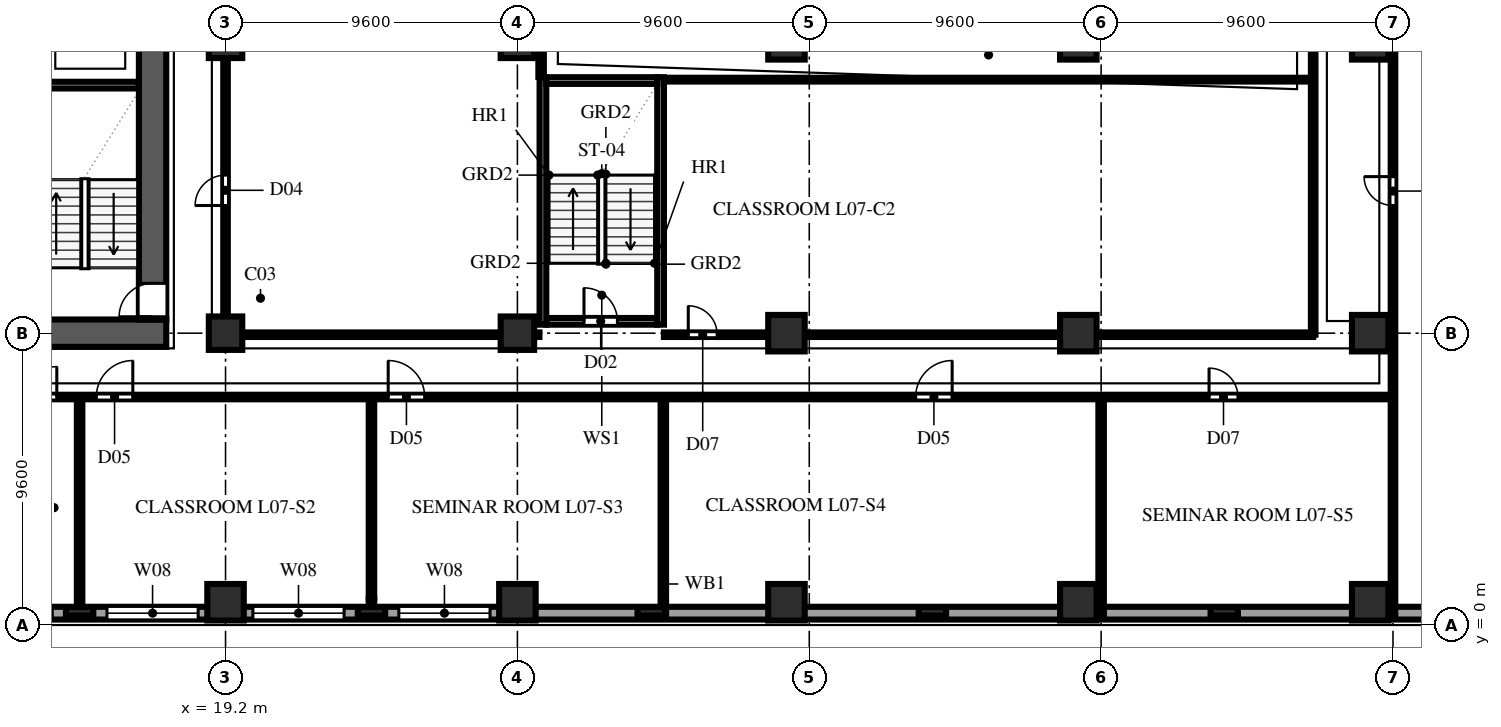
"""IFC4 building model, lengths in metres.
Left out: names, types, materials, properties, quantities, classifications, styles, units other than length and angle.
Written with IfcOpenShell. Run it as: python <this file> out.ifc"""

import sys

from ifc_helpers import new_model, si_unit, direction, frame, frame_2d, origin, origin_2d, place, context, subcontext, project, spatial, rectangle, extrude, element, fill, save


model = new_model("IFC4")
c1 = context("Model", 3, precision=1e-05, world=origin(), true_north=direction((0.0, 1.0)))
c2 = subcontext(c1, "Body", "Model", "MODEL_VIEW")
j1 = project(units=[si_unit("LENGTHUNIT", "METRE"), si_unit("PLANEANGLEUNIT", "RADIAN")], contexts=[c1])
p1 = place(None, origin())
s1 = spatial("IfcSite", under=j1, at=p1, CompositionType="ELEMENT")
p2 = place(p1, origin())
s2 = spatial("IfcBuilding", under=s1, at=p2, CompositionType="ELEMENT")
p3 = place(p2, frame((0.0, 0.0, 31.8)))
s3 = spatial("IfcBuildingStorey", under=s2, at=p3, CompositionType="ELEMENT", Elevation=31.8)
p4 = place(p3, frame((2.65, 9.6, 0.0), z_axis=(0.0, 0.0, 1.0), x_axis=(1.0, 0.0, 0.0)))
e1 = element("IfcWall", 1, at=p4, inside=s3, PredefinedType="SHEAR", context=c2, shape_type="SweptSolid", body=[
    extrude(rectangle(XDim=14.6, YDim=0.9, at=frame_2d((7.3, 0.0))), origin(), (0.0, 0.0, 1.0), 3.54),
])
p5 = place(p3, frame((16.8, 10.05, 0.0), z_axis=(0.0, 0.0, 1.0), x_axis=(0.0, 1.0, 0.0)))
e2 = element("IfcWall", 2, at=p5, inside=s3, PredefinedType="SHEAR", context=c2, shape_type="SweptSolid", body=[
    extrude(rectangle(XDim=12.35, YDim=0.9, at=frame_2d((6.175, 0.0))), origin(), (0.0, 0.0, 1.0), 3.54),
])
p6 = place(p5, frame((0.09, 0.0, 0.0)))
e3 = element("IfcOpeningElement", 3, at=p6, cuts=e2, PredefinedType="OPENING", context=c2, shape_type="SweptSolid", body=[
    extrude(rectangle(XDim=1.1, YDim=2.2, at=frame_2d((0.55, 1.1))), frame((0.0, 0.462, 0.0), z_axis=(0.0, -1.0, 0.0), x_axis=(1.0, 0.0, 0.0)), (0.0, 0.0, 1.0), 0.924),
])
p7 = place(p3, frame((19.2, 0.75, 0.0), z_axis=(0.0, 0.0, 1.0), x_axis=(1.0, 0.0, 0.0)))
e4 = element("IfcColumn", 4, at=p7, inside=s3, PredefinedType="COLUMN", context=c2, shape_type="SweptSolid", body=[
    extrude(rectangle(XDim=1.2, YDim=1.2, at=origin_2d()), origin(), (0.0, 0.0, 1.0), 3.8),
])
for number, where, z_axis, x_axis in (
    (5, (19.2, 9.6, 0.0), (0.0, 0.0, 1.0), (1.0, 0.0, 0.0)),
    (6, (19.2, 19.2, 0.0), (0.0, 0.0, 1.0), (1.0, 0.0, 0.0)),
):
    element("IfcColumn", number, at=place(p3, frame(where, z_axis=z_axis, x_axis=x_axis)), inside=s3, PredefinedType="COLUMN", context=c2, shape_type="SweptSolid", body=[
        extrude(rectangle(XDim=1.1, YDim=1.1, at=origin_2d()), origin(), (0.0, 0.0, 1.0), 3.8),
    ])
p8 = place(p3, frame((28.8, 0.75, 0.0), z_axis=(0.0, 0.0, 1.0), x_axis=(1.0, 0.0, 0.0)))
e7 = element("IfcColumn", 7, at=p8, inside=s3, PredefinedType="COLUMN", context=c2, shape_type="SweptSolid", body=[
    extrude(rectangle(XDim=1.2, YDim=1.2, at=origin_2d()), origin(), (0.0, 0.0, 1.0), 3.8),
])
for number, where, z_axis, x_axis in (
    (8, (28.8, 9.6, 0.0), (0.0, 0.0, 1.0), (1.0, 0.0, 0.0)),
    (9, (28.8, 19.2, 0.0), (0.0, 0.0, 1.0), (1.0, 0.0, 0.0)),
):
    element("IfcColumn", number, at=place(p3, frame(where, z_axis=z_axis, x_axis=x_axis)), inside=s3, PredefinedType="COLUMN", context=c2, shape_type="SweptSolid", body=[
        extrude(rectangle(XDim=1.1, YDim=1.1, at=origin_2d()), origin(), (0.0, 0.0, 1.0), 3.8),
    ])
for number, where, z_axis, x_axis in (
    (10, (37.65, 0.75, 0.0), (0.0, 0.0, 1.0), (1.0, 0.0, 0.0)),
    (11, (37.65, 9.6, 0.0), (0.0, 0.0, 1.0), (1.0, 0.0, 0.0)),
    (12, (37.65, 19.2, 0.0), (0.0, 0.0, 1.0), (1.0, 0.0, 0.0)),
    (13, (47.25, 0.75, 0.0), (0.0, 0.0, 1.0), (1.0, 0.0, 0.0)),
    (14, (47.25, 9.6, 0.0), (0.0, 0.0, 1.0), (1.0, 0.0, 0.0)),
    (15, (47.25, 19.2, 0.0), (0.0, 0.0, 1.0), (1.0, 0.0, 0.0)),
    (16, (56.85, 0.75, 0.0), (0.0, 0.0, 1.0), (1.0, 0.0, 0.0)),
    (17, (56.85, 9.6, 0.0), (0.0, 0.0, 1.0), (1.0, 0.0, 0.0)),
    (18, (56.85, 19.2, 0.0), (0.0, 0.0, 1.0), (1.0, 0.0, 0.0)),
):
    element("IfcColumn", number, at=place(p3, frame(where, z_axis=z_axis, x_axis=x_axis)), inside=s3, PredefinedType="COLUMN", context=c2, shape_type="SweptSolid", body=[
        extrude(rectangle(XDim=1.2, YDim=1.2, at=origin_2d()), origin(), (0.0, 0.0, 1.0), 3.8),
    ])
for number, where, z_axis, x_axis in (
    (19, (14.4, 0.45, 0.0), (0.0, 0.0, 1.0), (1.0, 0.0, 0.0)),
    (20, (24.0, 0.45, 0.0), (0.0, 0.0, 1.0), (1.0, 0.0, 0.0)),
    (21, (33.2, 0.45, 0.0), (0.0, 0.0, 1.0), (1.0, 0.0, 0.0)),
    (22, (42.45, 0.45, 0.0), (0.0, 0.0, 1.0), (1.0, 0.0, 0.0)),
    (23, (52.05, 0.45, 0.0), (0.0, 0.0, 1.0), (1.0, 0.0, 0.0)),
):
    element("IfcColumn", number, at=place(p3, frame(where, z_axis=z_axis, x_axis=x_axis)), inside=s3, PredefinedType="PILASTER", context=c2, shape_type="SweptSolid", body=[
        extrude(rectangle(XDim=0.9, YDim=0.28, at=origin_2d()), origin(), (0.0, 0.0, 1.0), 3.8),
    ])
p9 = place(p3, frame((1.84, 0.39, 0.0), z_axis=(0.0, 0.0, 1.0), x_axis=(1.0, 0.0, 0.0)))
e24 = element("IfcWall", 24, at=p9, inside=s3, PredefinedType="SOLIDWALL", context=c2, shape_type="SweptSolid", body=[
    extrude(rectangle(XDim=63.52, YDim=0.42, at=frame_2d((31.76, 0.0))), origin(), (0.0, 0.0, 1.0), 3.54),
])
p10 = place(p9, frame((3.86, 0.0, 0.75)))
e25 = element("IfcOpeningElement", 25, at=p10, cuts=e24, PredefinedType="OPENING", context=c2, shape_type="SweptSolid", body=[
    extrude(rectangle(XDim=3.0, YDim=1.9, at=frame_2d((1.5, 0.95))), frame((0.0, 0.222, 0.0), z_axis=(0.0, -1.0, 0.0), x_axis=(1.0, 0.0, 0.0)), (0.0, 0.0, 1.0), 0.444),
])
p11 = place(p9, frame((8.66, 0.0, 0.75)))
e26 = element("IfcOpeningElement", 26, at=p11, cuts=e24, PredefinedType="OPENING", context=c2, shape_type="SweptSolid", body=[
    extrude(rectangle(XDim=3.0, YDim=1.9, at=frame_2d((1.5, 0.95))), frame((0.0, 0.222, 0.0), z_axis=(0.0, -1.0, 0.0), x_axis=(1.0, 0.0, 0.0)), (0.0, 0.0, 1.0), 0.444),
])
p12 = place(p9, frame((13.46, 0.0, 0.75)))
e27 = element("IfcOpeningElement", 27, at=p12, cuts=e24, PredefinedType="OPENING", context=c2, shape_type="SweptSolid", body=[
    extrude(rectangle(XDim=3.0, YDim=1.9, at=frame_2d((1.5, 0.95))), frame((0.0, 0.222, 0.0), z_axis=(0.0, -1.0, 0.0), x_axis=(1.0, 0.0, 0.0)), (0.0, 0.0, 1.0), 0.444),
])
p13 = place(p9, frame((18.26, 0.0, 0.75)))
e28 = element("IfcOpeningElement", 28, at=p13, cuts=e24, PredefinedType="OPENING", context=c2, shape_type="SweptSolid", body=[
    extrude(rectangle(XDim=3.0, YDim=1.9, at=frame_2d((1.5, 0.95))), frame((0.0, 0.222, 0.0), z_axis=(0.0, -1.0, 0.0), x_axis=(1.0, 0.0, 0.0)), (0.0, 0.0, 1.0), 0.444),
])
p14 = place(p9, frame((23.06, 0.0, 0.75)))
e29 = element("IfcOpeningElement", 29, at=p14, cuts=e24, PredefinedType="OPENING", context=c2, shape_type="SweptSolid", body=[
    extrude(rectangle(XDim=3.0, YDim=1.9, at=frame_2d((1.5, 0.95))), frame((0.0, 0.222, 0.0), z_axis=(0.0, -1.0, 0.0), x_axis=(1.0, 0.0, 0.0)), (0.0, 0.0, 1.0), 0.444),
])
p15 = place(p3, frame((12.75, 17.76, 0.0), z_axis=(0.0, 0.0, 1.0), x_axis=(1.0, 0.0, 0.0)))
e30 = element("IfcWall", 30, at=p15, inside=s3, PredefinedType="SOLIDWALL", context=c2, shape_type="SweptSolid", body=[
    extrude(rectangle(XDim=3.6, YDim=0.22, at=frame_2d((1.8, 0.0))), origin(), (0.0, 0.0, 1.0), 3.54),
])
p16 = place(p3, frame((29.75, 9.99, 0.0), z_axis=(0.0, 0.0, 1.0), x_axis=(1.0, 0.0, 0.0)))
e31 = element("IfcWall", 31, at=p16, inside=s3, PredefinedType="SOLIDWALL", context=c2, shape_type="SweptSolid", body=[
    extrude(rectangle(XDim=3.65, YDim=0.22, at=frame_2d((1.825, 0.0))), origin(), (0.0, 0.0, 1.0), 3.54),
])
p17 = place(p16, frame((1.24, 0.0, 0.0)))
e32 = element("IfcOpeningElement", 32, at=p17, cuts=e31, PredefinedType="OPENING", context=c2, shape_type="SweptSolid", body=[
    extrude(rectangle(XDim=1.1, YDim=2.2, at=frame_2d((0.55, 1.1))), frame((0.0, 0.122, 0.0), z_axis=(0.0, -1.0, 0.0), x_axis=(1.0, 0.0, 0.0)), (0.0, 0.0, 1.0), 0.244),
])
for number, where, z_axis, x_axis in (
    (33, (29.64, 9.88, 0.0), (0.0, 0.0, 1.0), (0.0, 1.0, 0.0)),
    (34, (33.51, 9.88, 0.0), (0.0, 0.0, 1.0), (0.0, 1.0, 0.0)),
):
    element("IfcWall", number, at=place(p3, frame(where, z_axis=z_axis, x_axis=x_axis)), inside=s3, PredefinedType="SOLIDWALL", context=c2, shape_type="SweptSolid", body=[
        extrude(rectangle(XDim=8.14, YDim=0.22, at=frame_2d((4.07, 0.0))), origin(), (0.0, 0.0, 1.0), 3.54),
    ])
p18 = place(p3, frame((29.75, 17.91, 0.0), z_axis=(0.0, 0.0, 1.0), x_axis=(1.0, 0.0, 0.0)))
e35 = element("IfcWall", 35, at=p18, inside=s3, PredefinedType="SOLIDWALL", context=c2, shape_type="SweptSolid", body=[
    extrude(rectangle(XDim=3.65, YDim=0.22, at=frame_2d((1.825, 0.0))), origin(), (0.0, 0.0, 1.0), 3.54),
])
p19 = place(p3, frame((14.4, 0.22, 0.0), z_axis=(0.0, 0.0, 1.0), x_axis=(0.0, 1.0, 0.0)))
e36 = element("IfcWall", 36, at=p19, inside=s3, PredefinedType="PARTITIONING", context=c2, shape_type="SweptSolid", body=[
    extrude(rectangle(XDim=7.28, YDim=0.18, at=frame_2d((3.64, 0.0))), origin(), (0.0, 0.0, 1.0), 3.54),
])
p20 = place(p3, frame((24.0, 0.22, 0.0), z_axis=(0.0, 0.0, 1.0), x_axis=(0.0, 1.0, 0.0)))
e37 = element("IfcWall", 37, at=p20, inside=s3, PredefinedType="PARTITIONING", context=c2, shape_type="SweptSolid", body=[
    extrude(rectangle(XDim=0.645, YDim=0.18, at=frame_2d((0.323, 0.0))), origin(), (0.0, 0.0, 1.0), 3.54),
])
p21 = place(p3, frame((24.0, 0.865, 0.0), z_axis=(0.0, 0.0, 1.0), x_axis=(0.0, 1.0, 0.0)))
e38 = element("IfcWall", 38, at=p21, inside=s3, PredefinedType="PARTITIONING", context=c2, shape_type="SweptSolid", body=[
    extrude(rectangle(XDim=6.635, YDim=0.18, at=frame_2d((3.317, 0.0))), origin(), (0.0, 0.0, 1.0), 3.007),
])
for number, where, z_axis, x_axis in (
    (39, (33.6, 0.22, 0.0), (0.0, 0.0, 1.0), (0.0, 1.0, 0.0)),
    (40, (48.0, 0.22, 0.0), (0.0, 0.0, 1.0), (0.0, 1.0, 0.0)),
):
    element("IfcWall", number, at=place(p3, frame(where, z_axis=z_axis, x_axis=x_axis)), inside=s3, PredefinedType="PARTITIONING", context=c2, shape_type="SweptSolid", body=[
        extrude(rectangle(XDim=7.28, YDim=0.18, at=frame_2d((3.64, 0.0))), origin(), (0.0, 0.0, 1.0), 3.54),
    ])
p22 = place(p3, frame((0.22, 7.5, 0.0), z_axis=(0.0, 0.0, 1.0), x_axis=(1.0, 0.0, 0.0)))
e41 = element("IfcWall", 41, at=p22, inside=s3, PredefinedType="PARTITIONING", context=c2, shape_type="SweptSolid", body=[
    extrude(rectangle(XDim=57.38, YDim=0.15, at=frame_2d((28.69, 0.0))), origin(), (0.0, 0.0, 1.0), 3.54),
])
p23 = place(p22, frame((11.43, 0.0, 0.0)))
e42 = element("IfcOpeningElement", 42, at=p23, cuts=e41, PredefinedType="OPENING", context=c2, shape_type="SweptSolid", body=[
    extrude(rectangle(XDim=2.0, YDim=2.3, at=frame_2d((1.0, 1.15))), frame((0.0, 0.087, 0.0), z_axis=(0.0, -1.0, 0.0), x_axis=(1.0, 0.0, 0.0)), (0.0, 0.0, 1.0), 0.174),
])
p24 = place(p22, frame((14.73, 0.0, 0.0)))
e43 = element("IfcOpeningElement", 43, at=p24, cuts=e41, PredefinedType="OPENING", context=c2, shape_type="SweptSolid", body=[
    extrude(rectangle(XDim=1.2, YDim=2.2, at=frame_2d((0.6, 1.1))), frame((0.0, 0.087, 0.0), z_axis=(0.0, -1.0, 0.0), x_axis=(1.0, 0.0, 0.0)), (0.0, 0.0, 1.0), 0.174),
])
p25 = place(p22, frame((24.33, 0.0, 0.0)))
e44 = element("IfcOpeningElement", 44, at=p25, cuts=e41, PredefinedType="OPENING", context=c2, shape_type="SweptSolid", body=[
    extrude(rectangle(XDim=1.2, YDim=2.2, at=frame_2d((0.6, 1.1))), frame((0.0, 0.087, 0.0), z_axis=(0.0, -1.0, 0.0), x_axis=(1.0, 0.0, 0.0)), (0.0, 0.0, 1.0), 0.174),
])
p26 = place(p22, frame((41.68, 0.0, 0.0)))
e45 = element("IfcOpeningElement", 45, at=p26, cuts=e41, PredefinedType="OPENING", context=c2, shape_type="SweptSolid", body=[
    extrude(rectangle(XDim=1.2, YDim=2.2, at=frame_2d((0.6, 1.1))), frame((0.0, 0.087, 0.0), z_axis=(0.0, -1.0, 0.0), x_axis=(1.0, 0.0, 0.0)), (0.0, 0.0, 1.0), 0.174),
])
p27 = place(p22, frame((51.33, 0.0, 0.0)))
e46 = element("IfcOpeningElement", 46, at=p27, cuts=e41, PredefinedType="OPENING", context=c2, shape_type="SweptSolid", body=[
    extrude(rectangle(XDim=0.95, YDim=2.15, at=frame_2d((0.475, 1.075))), frame((0.0, 0.087, 0.0), z_axis=(0.0, -1.0, 0.0), x_axis=(1.0, 0.0, 0.0)), (0.0, 0.0, 1.0), 0.174),
])
p28 = place(p3, frame((57.6, 0.22, 0.0), z_axis=(0.0, 0.0, 1.0), x_axis=(0.0, 1.0, 0.0)))
e47 = element("IfcWall", 47, at=p28, inside=s3, PredefinedType="PARTITIONING", context=c2, shape_type="SweptSolid", body=[
    extrude(rectangle(XDim=37.96, YDim=0.15, at=frame_2d((18.98, 0.0))), origin(), (0.0, 0.0, 1.0), 3.54),
])
p29 = place(p28, frame((13.58, 0.0, 0.0)))
e48 = element("IfcOpeningElement", 48, at=p29, cuts=e47, PredefinedType="OPENING", context=c2, shape_type="SweptSolid", body=[
    extrude(rectangle(XDim=0.95, YDim=2.15, at=frame_2d((0.475, 1.075))), frame((0.0, 0.087, 0.0), z_axis=(0.0, -1.0, 0.0), x_axis=(1.0, 0.0, 0.0)), (0.0, 0.0, 1.0), 0.174),
])
p30 = place(p3, frame((19.2, 9.55, 0.0), z_axis=(0.0, 0.0, 1.0), x_axis=(0.0, 1.0, 0.0)))
e49 = element("IfcWall", 49, at=p30, inside=s3, PredefinedType="PARTITIONING", context=c2, shape_type="SweptSolid", body=[
    extrude(rectangle(XDim=15.85, YDim=0.15, at=frame_2d((7.925, 0.0))), origin(), (0.0, 0.0, 1.0), 2.923),
])
p31 = place(p30, frame((4.25, 0.0, 0.0)))
e50 = element("IfcOpeningElement", 50, at=p31, cuts=e49, PredefinedType="OPENING", context=c2, shape_type="SweptSolid", body=[
    extrude(rectangle(XDim=1.0, YDim=2.2, at=frame_2d((0.5, 1.1))), frame((0.0, 0.087, 0.0), z_axis=(0.0, -1.0, 0.0), x_axis=(1.0, 0.0, 0.0)), (0.0, 0.0, 1.0), 0.174),
])
p32 = place(p3, frame((29.58, 18.025, 0.0), z_axis=(0.0, 0.0, 1.0), x_axis=(0.0, 1.0, 0.0)))
e51 = element("IfcWall", 51, at=p32, inside=s3, PredefinedType="PARTITIONING", context=c2, shape_type="SweptSolid", body=[
    extrude(rectangle(XDim=7.28, YDim=0.18, at=frame_2d((3.64, 0.0))), origin(), (0.0, 0.0, 1.0), 3.54),
])
p33 = place(p3, frame((19.28, 9.55, 0.0), z_axis=(0.0, 0.0, 1.0), x_axis=(1.0, 0.0, 0.0)))
e52 = element("IfcWall", 52, at=p33, inside=s3, PredefinedType="PARTITIONING", context=c2, shape_type="SweptSolid", body=[
    extrude(rectangle(XDim=10.245, YDim=0.15, at=frame_2d((5.123, 0.0))), origin(), (0.0, 0.0, 1.0), 2.923),
])
p34 = place(p3, frame((33.62, 17.94, 0.0), z_axis=(0.0, 0.0, 1.0), x_axis=(1.0, 0.0, 0.0)))
e53 = element("IfcWall", 53, at=p34, inside=s3, PredefinedType="PARTITIONING", context=c2, shape_type="SweptSolid", body=[
    extrude(rectangle(XDim=21.355, YDim=0.125, at=frame_2d((10.677, 0.0))), origin(), (0.0, 0.0, 1.0), 3.54),
])
p35 = place(p3, frame((33.62, 9.55, 0.0), z_axis=(0.0, 0.0, 1.0), x_axis=(1.0, 0.0, 0.0)))
e54 = element("IfcWall", 54, at=p35, inside=s3, PredefinedType="PARTITIONING", context=c2, shape_type="SweptSolid", body=[
    extrude(rectangle(XDim=21.355, YDim=0.15, at=frame_2d((10.677, 0.0))), origin(), (0.0, 0.0, 1.0), 2.923),
])
p36 = place(p35, frame((0.8, 0.0, 0.0)))
e55 = element("IfcOpeningElement", 55, at=p36, cuts=e54, PredefinedType="OPENING", context=c2, shape_type="SweptSolid", body=[
    extrude(rectangle(XDim=0.95, YDim=2.15, at=frame_2d((0.475, 1.075))), frame((0.0, 0.087, 0.0), z_axis=(0.0, -1.0, 0.0), x_axis=(1.0, 0.0, 0.0)), (0.0, 0.0, 1.0), 0.174),
])
p37 = place(p3, frame((54.975, 9.55, 0.0), z_axis=(0.0, 0.0, 1.0), x_axis=(0.0, 1.0, 0.0)))
e56 = element("IfcWall", 56, at=p37, inside=s3, PredefinedType="PARTITIONING", context=c2, shape_type="SweptSolid", body=[
    extrude(rectangle(XDim=15.85, YDim=0.15, at=frame_2d((7.925, 0.0))), origin(), (0.0, 0.0, 1.0), 3.54),
])
p38 = place(p11, origin())
e57 = element("IfcWindow", 57, at=p38, inside=s3, PartitioningType="TRIPLE_PANEL_VERTICAL", PredefinedType="WINDOW", context=c2, shape_type="SweptSolid", body=[
    extrude(rectangle(XDim=3.0, YDim=1.9, at=frame_2d((1.5, 0.95))), frame((0.0, 0.11, 0.0), z_axis=(0.0, -1.0, 0.0), x_axis=(1.0, 0.0, 0.0)), (0.0, 0.0, 1.0), 0.06),
])
fill(e26, e57)
p39 = place(p12, origin())
e58 = element("IfcWindow", 58, at=p39, inside=s3, PartitioningType="TRIPLE_PANEL_VERTICAL", PredefinedType="WINDOW", context=c2, shape_type="SweptSolid", body=[
    extrude(rectangle(XDim=3.0, YDim=1.9, at=frame_2d((1.5, 0.95))), frame((0.0, 0.11, 0.0), z_axis=(0.0, -1.0, 0.0), x_axis=(1.0, 0.0, 0.0)), (0.0, 0.0, 1.0), 0.06),
])
fill(e27, e58)
p40 = place(p13, origin())
e59 = element("IfcWindow", 59, at=p40, inside=s3, PartitioningType="TRIPLE_PANEL_VERTICAL", PredefinedType="WINDOW", context=c2, shape_type="SweptSolid", body=[
    extrude(rectangle(XDim=3.0, YDim=1.9, at=frame_2d((1.5, 0.95))), frame((0.0, 0.11, 0.0), z_axis=(0.0, -1.0, 0.0), x_axis=(1.0, 0.0, 0.0)), (0.0, 0.0, 1.0), 0.06),
])
fill(e28, e59)
p41 = place(p14, origin())
e60 = element("IfcWindow", 60, at=p41, inside=s3, PartitioningType="TRIPLE_PANEL_VERTICAL", PredefinedType="WINDOW", context=c2, shape_type="SweptSolid", body=[
    extrude(rectangle(XDim=3.0, YDim=1.9, at=frame_2d((1.5, 0.95))), frame((0.0, 0.11, 0.0), z_axis=(0.0, -1.0, 0.0), x_axis=(1.0, 0.0, 0.0)), (0.0, 0.0, 1.0), 0.06),
])
fill(e29, e60)
p42 = place(p6, origin())
e61 = element("IfcDoor", 61, at=p42, inside=s3, OperationType="SINGLE_SWING_LEFT", PredefinedType="DOOR", context=c2, shape_type="SweptSolid", body=[
    extrude(rectangle(XDim=1.1, YDim=2.2, at=frame_2d((0.55, 1.1))), frame((0.0, 0.025, 0.0), z_axis=(0.0, -1.0, 0.0), x_axis=(1.0, 0.0, 0.0)), (0.0, 0.0, 1.0), 0.05),
])
fill(e3, e61)
p43 = place(p17, origin())
e62 = element("IfcDoor", 62, at=p43, inside=s3, OperationType="SINGLE_SWING_LEFT", PredefinedType="DOOR", context=c2, shape_type="SweptSolid", body=[
    extrude(rectangle(XDim=1.1, YDim=2.2, at=frame_2d((0.55, 1.1))), frame((0.0, 0.025, 0.0), z_axis=(0.0, -1.0, 0.0), x_axis=(1.0, 0.0, 0.0)), (0.0, 0.0, 1.0), 0.05),
])
fill(e32, e62)
p44 = place(p23, origin())
e63 = element("IfcDoor", 63, at=p44, inside=s3, OperationType="DOUBLE_SWING_LEFT", PredefinedType="DOOR", context=c2, shape_type="SweptSolid", body=[
    extrude(rectangle(XDim=2.0, YDim=2.3, at=frame_2d((1.0, 1.15))), frame((0.0, 0.025, 0.0), z_axis=(0.0, -1.0, 0.0), x_axis=(1.0, 0.0, 0.0)), (0.0, 0.0, 1.0), 0.05),
])
fill(e42, e63)
p45 = place(p24, origin())
e64 = element("IfcDoor", 64, at=p45, inside=s3, OperationType="SINGLE_SWING_RIGHT", PredefinedType="DOOR", context=c2, shape_type="SweptSolid", body=[
    extrude(rectangle(XDim=1.2, YDim=2.2, at=frame_2d((0.6, 1.1))), frame((0.0, 0.025, 0.0), z_axis=(0.0, -1.0, 0.0), x_axis=(1.0, 0.0, 0.0)), (0.0, 0.0, 1.0), 0.05),
])
fill(e43, e64)
p46 = place(p25, origin())
e65 = element("IfcDoor", 65, at=p46, inside=s3, OperationType="SINGLE_SWING_LEFT", PredefinedType="DOOR", context=c2, shape_type="SweptSolid", body=[
    extrude(rectangle(XDim=1.2, YDim=2.2, at=frame_2d((0.6, 1.1))), frame((0.0, 0.025, 0.0), z_axis=(0.0, -1.0, 0.0), x_axis=(1.0, 0.0, 0.0)), (0.0, 0.0, 1.0), 0.05),
])
fill(e44, e65)
p47 = place(p26, origin())
e66 = element("IfcDoor", 66, at=p47, inside=s3, OperationType="SINGLE_SWING_RIGHT", PredefinedType="DOOR", context=c2, shape_type="SweptSolid", body=[
    extrude(rectangle(XDim=1.2, YDim=2.2, at=frame_2d((0.6, 1.1))), frame((0.0, 0.025, 0.0), z_axis=(0.0, -1.0, 0.0), x_axis=(1.0, 0.0, 0.0)), (0.0, 0.0, 1.0), 0.05),
])
fill(e45, e66)
p48 = place(p27, origin())
e67 = element("IfcDoor", 67, at=p48, inside=s3, OperationType="SINGLE_SWING_LEFT", PredefinedType="DOOR", context=c2, shape_type="SweptSolid", body=[
    extrude(rectangle(XDim=0.95, YDim=2.15, at=frame_2d((0.475, 1.075))), frame((0.0, 0.025, 0.0), z_axis=(0.0, -1.0, 0.0), x_axis=(1.0, 0.0, 0.0)), (0.0, 0.0, 1.0), 0.05),
])
fill(e46, e67)
p49 = place(p29, origin())
e68 = element("IfcDoor", 68, at=p49, inside=s3, OperationType="SINGLE_SWING_RIGHT", PredefinedType="DOOR", context=c2, shape_type="SweptSolid", body=[
    extrude(rectangle(XDim=0.95, YDim=2.15, at=frame_2d((0.475, 1.075))), frame((0.0, 0.025, 0.0), z_axis=(0.0, -1.0, 0.0), x_axis=(1.0, 0.0, 0.0)), (0.0, 0.0, 1.0), 0.05),
])
fill(e48, e68)
p50 = place(p31, origin())
e69 = element("IfcDoor", 69, at=p50, inside=s3, OperationType="SINGLE_SWING_LEFT", PredefinedType="DOOR", context=c2, shape_type="SweptSolid", body=[
    extrude(rectangle(XDim=1.0, YDim=2.2, at=frame_2d((0.5, 1.1))), frame((0.0, 0.025, 0.0), z_axis=(0.0, -1.0, 0.0), x_axis=(1.0, 0.0, 0.0)), (0.0, 0.0, 1.0), 0.05),
])
fill(e50, e69)
p51 = place(p36, origin())
e70 = element("IfcDoor", 70, at=p51, inside=s3, OperationType="SINGLE_SWING_LEFT", PredefinedType="DOOR", context=c2, shape_type="SweptSolid", body=[
    extrude(rectangle(XDim=0.95, YDim=2.15, at=frame_2d((0.475, 1.075))), frame((0.0, 0.025, 0.0), z_axis=(0.0, -1.0, 0.0), x_axis=(1.0, 0.0, 0.0)), (0.0, 0.0, 1.0), 0.05),
])
fill(e55, e70)
save(model, sys.argv[1])
